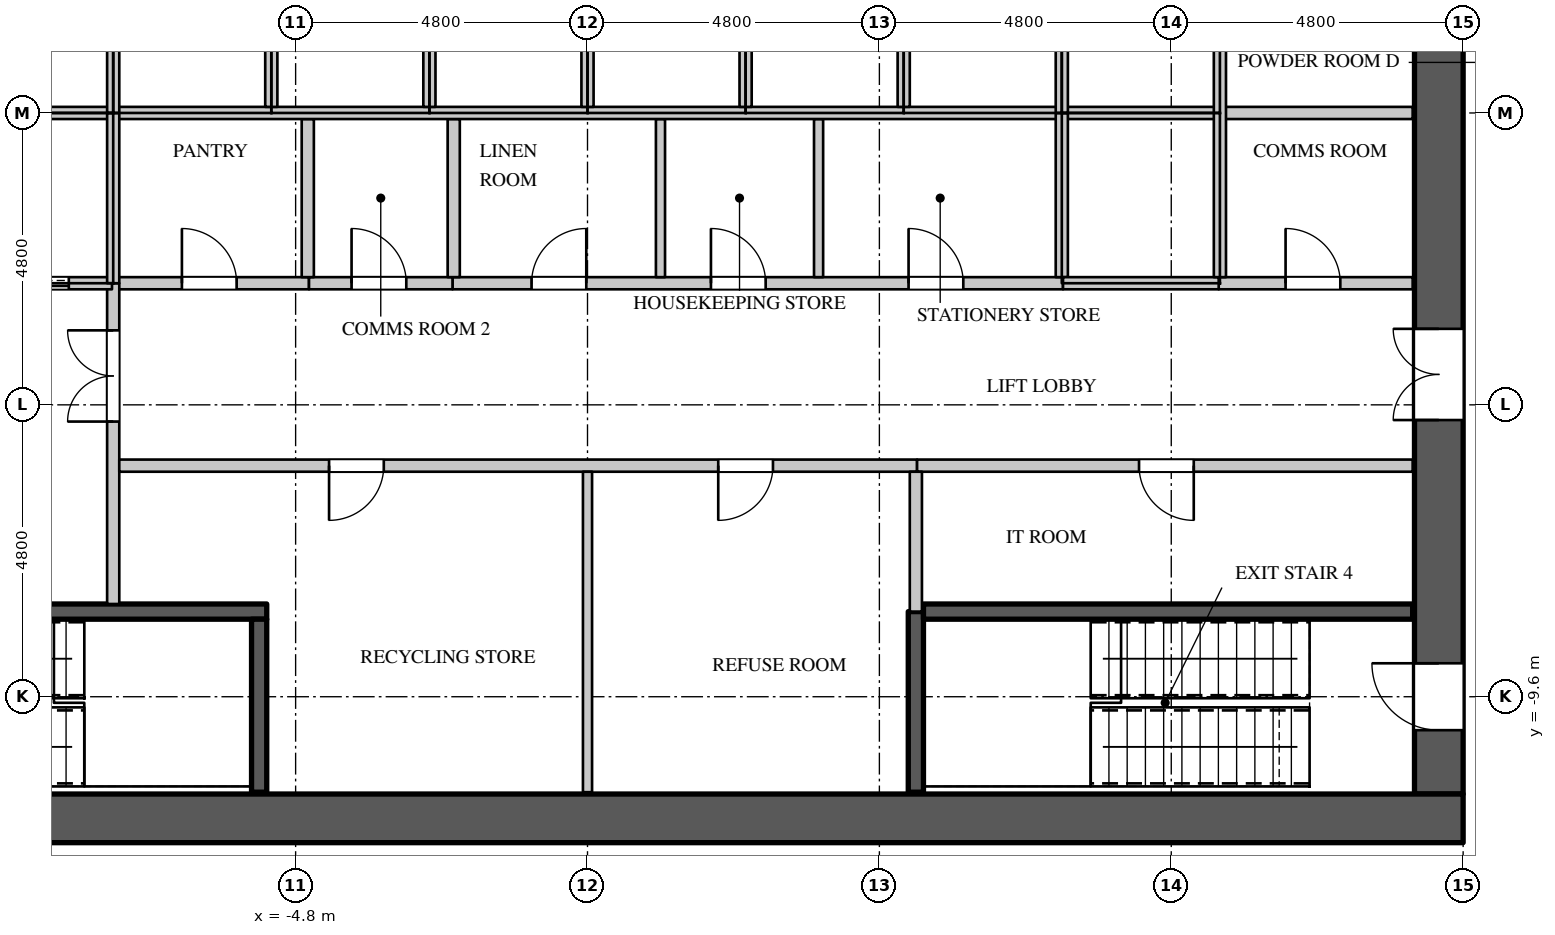
"""IFC4 building model, lengths in metres.
Left out: names, types, materials, properties, quantities, classifications, styles, units other than length and angle.
Written with IfcOpenShell. Run it as: python <this file> out.ifc"""

import sys

from ifc_helpers import new_model, si_unit, direction, frame, frame_2d, origin, place, context, subcontext, project, spatial, rectangle, extrude, element, fill, save


model = new_model("IFC4")
c1 = context("Model", 3, precision=1e-05, world=origin(), true_north=direction((0.0, 1.0)))
c2 = subcontext(c1, "Body", "Model", "MODEL_VIEW")
j1 = project(units=[si_unit("LENGTHUNIT", "METRE"), si_unit("PLANEANGLEUNIT", "RADIAN")], contexts=[c1])
p1 = place(None, origin())
s1 = spatial("IfcSite", under=j1, at=p1, CompositionType="ELEMENT")
p2 = place(p1, origin())
s2 = spatial("IfcBuilding", under=s1, at=p2, CompositionType="ELEMENT")
p3 = place(p2, frame((0.0, 0.0, 106.5)))
s3 = spatial("IfcBuildingStorey", under=s2, at=p3, CompositionType="ELEMENT", Elevation=106.5)
p4 = place(p3, frame((-14.4, -11.6, 0.0), z_axis=(0.0, 0.0, 1.0), x_axis=(1.0, 0.0, 0.0)))
e1 = element("IfcWall", 1, at=p4, inside=s3, PredefinedType="SHEAR", context=c2, shape_type="SweptSolid", body=[
    extrude(rectangle(XDim=28.8, YDim=0.8, at=frame_2d((14.4, 0.0))), origin(), (0.0, 0.0, 1.0), 4.2),
])
p5 = place(p3, frame((14.0, -11.2, 0.0), z_axis=(0.0, 0.0, 1.0), x_axis=(0.0, 1.0, 0.0)))
e2 = element("IfcWall", 2, at=p5, inside=s3, PredefinedType="SHEAR", context=c2, shape_type="SweptSolid", body=[
    extrude(rectangle(XDim=22.4, YDim=0.8, at=frame_2d((11.2, 0.0))), origin(), (0.0, 0.0, 1.0), 4.2),
])
p6 = place(p5, frame((20.25, 0.0, 0.0)))
e3 = element("IfcOpeningElement", 3, at=p6, cuts=e2, PredefinedType="OPENING", context=c2, shape_type="SweptSolid", body=[
    extrude(rectangle(XDim=1.1, YDim=2.2, at=frame_2d((0.55, 1.1))), frame((0.0, 0.41, 0.0), z_axis=(0.0, -1.0, 0.0), x_axis=(1.0, 0.0, 0.0)), (0.0, 0.0, 1.0), 0.82),
])
p7 = place(p5, frame((1.05, 0.0, 0.0)))
e4 = element("IfcOpeningElement", 4, at=p7, cuts=e2, PredefinedType="OPENING", context=c2, shape_type="SweptSolid", body=[
    extrude(rectangle(XDim=1.1, YDim=2.2, at=frame_2d((0.55, 1.1))), frame((0.0, 0.41, 0.0), z_axis=(0.0, -1.0, 0.0), x_axis=(1.0, 0.0, 0.0)), (0.0, 0.0, 1.0), 0.82),
])
p8 = place(p5, frame((14.75, 0.0, 0.0)))
e5 = element("IfcOpeningElement", 5, at=p8, cuts=e2, PredefinedType="OPENING", context=c2, shape_type="SweptSolid", body=[
    extrude(rectangle(XDim=1.5, YDim=2.4, at=frame_2d((0.75, 1.2))), frame((0.0, 0.41, 0.0), z_axis=(0.0, -1.0, 0.0), x_axis=(1.0, 0.0, 0.0)), (0.0, 0.0, 1.0), 0.82),
])
p9 = place(p5, frame((6.15, 0.0, 0.0)))
e6 = element("IfcOpeningElement", 6, at=p9, cuts=e2, PredefinedType="OPENING", context=c2, shape_type="SweptSolid", body=[
    extrude(rectangle(XDim=1.5, YDim=2.4, at=frame_2d((0.75, 1.2))), frame((0.0, 0.41, 0.0), z_axis=(0.0, -1.0, 0.0), x_axis=(1.0, 0.0, 0.0)), (0.0, 0.0, 1.0), 0.82),
])
p10 = place(p3, frame((-7.82, -2.8, 0.0), z_axis=(0.0, 0.0, 1.0), x_axis=(1.0, 0.0, 0.0)))
e7 = element("IfcWall", 7, at=p10, inside=s3, PredefinedType="PARTITIONING", context=c2, shape_type="SweptSolid", body=[
    extrude(rectangle(XDim=3.24, YDim=0.2, at=frame_2d((1.62, 0.0))), origin(), (0.0, 0.0, 1.0), 3.95),
])
p11 = place(p10, frame((1.15, 0.0, 0.0)))
e8 = element("IfcOpeningElement", 8, at=p11, cuts=e7, PredefinedType="OPENING", context=c2, shape_type="SweptSolid", body=[
    extrude(rectangle(XDim=0.9, YDim=2.2, at=frame_2d((0.45, 1.1))), frame((0.0, 0.11, 0.0), z_axis=(0.0, -1.0, 0.0), x_axis=(1.0, 0.0, 0.0)), (0.0, 0.0, 1.0), 0.22),
])
p12 = place(p3, frame((-7.8, -8.075, 0.0), z_axis=(0.0, 0.0, 1.0), x_axis=(0.0, 1.0, 0.0)))
e9 = element("IfcWall", 9, at=p12, inside=s3, PredefinedType="PARTITIONING", context=c2, shape_type="SweptSolid", body=[
    extrude(rectangle(XDim=5.275, YDim=0.2, at=frame_2d((2.637, 0.0))), origin(), (0.0, 0.0, 1.0), 3.95),
])
p13 = place(p12, frame((3.0, 0.0, 0.0)))
e10 = element("IfcOpeningElement", 10, at=p13, cuts=e9, PredefinedType="OPENING", context=c2, shape_type="SweptSolid", body=[
    extrude(rectangle(XDim=1.5, YDim=2.4, at=frame_2d((0.75, 1.2))), frame((0.0, 0.11, 0.0), z_axis=(0.0, -1.0, 0.0), x_axis=(1.0, 0.0, 0.0)), (0.0, 0.0, 1.0), 0.22),
])
p14 = place(p3, frame((-7.7, -5.8, 0.0), z_axis=(0.0, 0.0, 1.0), x_axis=(1.0, 0.0, 0.0)))
e11 = element("IfcWall", 11, at=p14, inside=s3, PredefinedType="PARTITIONING", context=c2, shape_type="SweptSolid", body=[
    extrude(rectangle(XDim=13.12, YDim=0.2, at=frame_2d((6.56, 0.0))), origin(), (0.0, 0.0, 1.0), 3.95),
])
p15 = place(p14, frame((3.45, 0.0, 0.0)))
e12 = element("IfcOpeningElement", 12, at=p15, cuts=e11, PredefinedType="OPENING", context=c2, shape_type="SweptSolid", body=[
    extrude(rectangle(XDim=0.9, YDim=2.2, at=frame_2d((0.45, 1.1))), frame((0.0, 0.11, 0.0), z_axis=(0.0, -1.0, 0.0), x_axis=(1.0, 0.0, 0.0)), (0.0, 0.0, 1.0), 0.22),
])
p16 = place(p14, frame((9.85, 0.0, 0.0)))
e13 = element("IfcOpeningElement", 13, at=p16, cuts=e11, PredefinedType="OPENING", context=c2, shape_type="SweptSolid", body=[
    extrude(rectangle(XDim=0.9, YDim=2.2, at=frame_2d((0.45, 1.1))), frame((0.0, 0.11, 0.0), z_axis=(0.0, -1.0, 0.0), x_axis=(1.0, 0.0, 0.0)), (0.0, 0.0, 1.0), 0.22),
])
p17 = place(p3, frame((-2.22, -2.8, 0.0), z_axis=(0.0, 0.0, 1.0), x_axis=(1.0, 0.0, 0.0)))
e14 = element("IfcWall", 14, at=p17, inside=s3, PredefinedType="PARTITIONING", context=c2, shape_type="SweptSolid", body=[
    extrude(rectangle(XDim=10.04, YDim=0.2, at=frame_2d((5.02, 0.0))), origin(), (0.0, 0.0, 1.0), 3.95),
])
p18 = place(p17, frame((1.3, 0.0, 0.0)))
e15 = element("IfcOpeningElement", 15, at=p18, cuts=e14, PredefinedType="OPENING", context=c2, shape_type="SweptSolid", body=[
    extrude(rectangle(XDim=0.9, YDim=2.2, at=frame_2d((0.45, 1.1))), frame((0.0, 0.11, 0.0), z_axis=(0.0, -1.0, 0.0), x_axis=(1.0, 0.0, 0.0)), (0.0, 0.0, 1.0), 0.22),
])
p19 = place(p17, frame((4.25, 0.0, 0.0)))
e16 = element("IfcOpeningElement", 16, at=p19, cuts=e14, PredefinedType="OPENING", context=c2, shape_type="SweptSolid", body=[
    extrude(rectangle(XDim=0.9, YDim=2.2, at=frame_2d((0.45, 1.1))), frame((0.0, 0.11, 0.0), z_axis=(0.0, -1.0, 0.0), x_axis=(1.0, 0.0, 0.0)), (0.0, 0.0, 1.0), 0.22),
])
p20 = place(p17, frame((7.5, 0.0, 0.0)))
e17 = element("IfcOpeningElement", 17, at=p20, cuts=e14, PredefinedType="OPENING", context=c2, shape_type="SweptSolid", body=[
    extrude(rectangle(XDim=0.9, YDim=2.2, at=frame_2d((0.45, 1.1))), frame((0.0, 0.11, 0.0), z_axis=(0.0, -1.0, 0.0), x_axis=(1.0, 0.0, 0.0)), (0.0, 0.0, 1.0), 0.22),
])
p21 = place(p3, frame((0.0, -11.17, 0.0), z_axis=(0.0, 0.0, 1.0), x_axis=(0.0, 1.0, 0.0)))
e18 = element("IfcWall", 18, at=p21, inside=s3, PredefinedType="PARTITIONING", context=c2, shape_type="SweptSolid", body=[
    extrude(rectangle(XDim=5.27, YDim=0.15, at=frame_2d((2.635, 0.0))), origin(), (0.0, 0.0, 1.0), 3.95),
])
for number, where, z_axis, x_axis in (
    (19, (1.2, -2.7, 0.0), (0.0, 0.0, 1.0), (0.0, 1.0, 0.0)),
    (20, (3.8, -2.7, 0.0), (0.0, 0.0, 1.0), (0.0, 1.0, 0.0)),
):
    element("IfcWall", number, at=place(p3, frame(where, z_axis=z_axis, x_axis=x_axis)), inside=s3, PredefinedType="PARTITIONING", context=c2, shape_type="SweptSolid", body=[
        extrude(rectangle(XDim=2.6, YDim=0.15, at=frame_2d((1.3, 0.0))), origin(), (0.0, 0.0, 1.0), 3.95),
    ])
p22 = place(p3, frame((-4.58, -2.8, 0.0), z_axis=(0.0, 0.0, 1.0), x_axis=(1.0, 0.0, 0.0)))
e21 = element("IfcWall", 21, at=p22, inside=s3, PredefinedType="PARTITIONING", context=c2, shape_type="SweptSolid", body=[
    extrude(rectangle(XDim=2.36, YDim=0.2, at=frame_2d((1.18, 0.0))), origin(), (0.0, 0.0, 1.0), 3.95),
])
p23 = place(p22, frame((0.7, 0.0, 0.0)))
e22 = element("IfcOpeningElement", 22, at=p23, cuts=e21, PredefinedType="OPENING", context=c2, shape_type="SweptSolid", body=[
    extrude(rectangle(XDim=0.9, YDim=2.2, at=frame_2d((0.45, 1.1))), frame((0.0, 0.11, 0.0), z_axis=(0.0, -1.0, 0.0), x_axis=(1.0, 0.0, 0.0)), (0.0, 0.0, 1.0), 0.22),
])
for number, where, z_axis, x_axis in (
    (23, (-4.6, -2.7, 0.0), (0.0, 0.0, 1.0), (0.0, 1.0, 0.0)),
    (24, (-2.2, -2.7, 0.0), (0.0, 0.0, 1.0), (0.0, 1.0, 0.0)),
):
    element("IfcWall", number, at=place(p3, frame(where, z_axis=z_axis, x_axis=x_axis)), inside=s3, PredefinedType="PARTITIONING", context=c2, shape_type="SweptSolid", body=[
        extrude(rectangle(XDim=2.6, YDim=0.2, at=frame_2d((1.3, 0.0))), origin(), (0.0, 0.0, 1.0), 3.95),
    ])
p24 = place(p3, frame((5.42, -5.8, 0.0), z_axis=(0.0, 0.0, 1.0), x_axis=(1.0, 0.0, 0.0)))
e25 = element("IfcWall", 25, at=p24, inside=s3, PredefinedType="PARTITIONING", context=c2, shape_type="SweptSolid", body=[
    extrude(rectangle(XDim=8.15, YDim=0.2, at=frame_2d((4.075, 0.0))), origin(), (0.0, 0.0, 1.0), 3.95),
])
p25 = place(p24, frame((3.65, 0.0, 0.0)))
e26 = element("IfcOpeningElement", 26, at=p25, cuts=e25, PredefinedType="OPENING", context=c2, shape_type="SweptSolid", body=[
    extrude(rectangle(XDim=0.9, YDim=2.2, at=frame_2d((0.45, 1.1))), frame((0.0, 0.11, 0.0), z_axis=(0.0, -1.0, 0.0), x_axis=(1.0, 0.0, 0.0)), (0.0, 0.0, 1.0), 0.22),
])
p26 = place(p3, frame((5.4, -8.2, 0.0), z_axis=(0.0, 0.0, 1.0), x_axis=(0.0, 1.0, 0.0)))
e27 = element("IfcWall", 27, at=p26, inside=s3, PredefinedType="PARTITIONING", context=c2, shape_type="SweptSolid", body=[
    extrude(rectangle(XDim=2.3, YDim=0.2, at=frame_2d((1.15, 0.0))), origin(), (0.0, 0.0, 1.0), 3.95),
])
p27 = place(p3, frame((10.38, -2.8, 0.0), z_axis=(0.0, 0.0, 1.0), x_axis=(1.0, 0.0, 0.0)))
e28 = element("IfcWall", 28, at=p27, inside=s3, PredefinedType="PARTITIONING", context=c2, shape_type="SweptSolid", body=[
    extrude(rectangle(XDim=3.19, YDim=0.2, at=frame_2d((1.595, 0.0))), origin(), (0.0, 0.0, 1.0), 3.95),
])
p28 = place(p27, frame((1.1, 0.0, 0.0)))
e29 = element("IfcOpeningElement", 29, at=p28, cuts=e28, PredefinedType="OPENING", context=c2, shape_type="SweptSolid", body=[
    extrude(rectangle(XDim=0.9, YDim=2.2, at=frame_2d((0.45, 1.1))), frame((0.0, 0.11, 0.0), z_axis=(0.0, -1.0, 0.0), x_axis=(1.0, 0.0, 0.0)), (0.0, 0.0, 1.0), 0.22),
])
p29 = place(p3, frame((10.4, 0.0, 0.0), z_axis=(0.0, 0.0, 1.0), x_axis=(1.0, 0.0, 0.0)))
e30 = element("IfcWall", 30, at=p29, inside=s3, PredefinedType="PARTITIONING", context=c2, shape_type="SweptSolid", body=[
    extrude(rectangle(XDim=3.17, YDim=0.2, at=frame_2d((1.585, 0.0))), origin(), (0.0, 0.0, 1.0), 3.95),
])
p30 = place(p3, frame((-13.57, 0.0, 0.0), z_axis=(0.0, 0.0, 1.0), x_axis=(1.0, 0.0, 0.0)))
e31 = element("IfcWall", 31, at=p30, inside=s3, PredefinedType="PARTITIONING", context=c2, shape_type="SweptSolid", body=[
    extrude(rectangle(XDim=23.97, YDim=0.2, at=frame_2d((11.985, 0.0))), origin(), (0.0, 0.0, 1.0), 3.95),
])
p31 = place(p3, frame((-10.38, -2.8, 0.0), z_axis=(0.0, 0.0, 1.0), x_axis=(1.0, 0.0, 0.0)))
e32 = element("IfcWall", 32, at=p31, inside=s3, PredefinedType="PARTITIONING", context=c2, shape_type="SweptSolid", body=[
    extrude(rectangle(XDim=2.56, YDim=0.2, at=frame_2d((1.28, 0.0))), origin(), (0.0, 0.0, 1.0), 3.95),
])
p32 = place(p31, frame((0.75, 0.0, 0.0)))
e33 = element("IfcOpeningElement", 33, at=p32, cuts=e32, PredefinedType="OPENING", context=c2, shape_type="SweptSolid", body=[
    extrude(rectangle(XDim=1.1, YDim=2.2, at=frame_2d((0.55, 1.1))), frame((0.0, 0.11, 0.0), z_axis=(0.0, -1.0, 0.0), x_axis=(1.0, 0.0, 0.0)), (0.0, 0.0, 1.0), 0.22),
])
for number, where, z_axis, x_axis in (
    (34, (-7.8, -2.8, 0.0), (0.0, 0.0, 1.0), (0.0, 1.0, 0.0)),
    (35, (-7.8, 0.0, 0.0), (0.0, 0.0, 1.0), (0.0, 1.0, 0.0)),
):
    element("IfcWall", number, at=place(p3, frame(where, z_axis=z_axis, x_axis=x_axis)), inside=s3, PredefinedType="PARTITIONING", context=c2, shape_type="SweptSolid", body=[
        extrude(rectangle(XDim=2.8, YDim=0.2, at=frame_2d((1.4, 0.0))), origin(), (0.0, 0.0, 1.0), 3.95),
    ])
for number, where, z_axis, x_axis in (
    (36, (-5.2, 0.1, 0.0), (0.0, 0.0, 1.0), (0.0, 1.0, 0.0)),
    (37, (-2.6, 0.1, 0.0), (0.0, 0.0, 1.0), (0.0, 1.0, 0.0)),
    (38, (0.0, 0.1, 0.0), (0.0, 0.0, 1.0), (0.0, 1.0, 0.0)),
    (39, (2.6, 0.1, 0.0), (0.0, 0.0, 1.0), (0.0, 1.0, 0.0)),
    (40, (5.2, 0.1, 0.0), (0.0, 0.0, 1.0), (0.0, 1.0, 0.0)),
):
    element("IfcWall", number, at=place(p3, frame(where, z_axis=z_axis, x_axis=x_axis)), inside=s3, PredefinedType="PARTITIONING", context=c2, shape_type="SweptSolid", body=[
        extrude(rectangle(XDim=2.6, YDim=0.2, at=frame_2d((1.3, 0.0))), origin(), (0.0, 0.0, 1.0), 3.95),
    ])
p33 = place(p3, frame((7.8, -2.7, 0.0), z_axis=(0.0, 0.0, 1.0), x_axis=(0.0, 1.0, 0.0)))
e41 = element("IfcWall", 41, at=p33, inside=s3, PredefinedType="PARTITIONING", context=c2, shape_type="SweptSolid", body=[
    extrude(rectangle(XDim=2.7, YDim=0.2, at=frame_2d((1.35, 0.0))), origin(), (0.0, 0.0, 1.0), 3.95),
])
p34 = place(p3, frame((7.82, -2.8, 0.0), z_axis=(0.0, 0.0, 1.0), x_axis=(1.0, 0.0, 0.0)))
e42 = element("IfcWall", 42, at=p34, inside=s3, PredefinedType="PARTITIONING", context=c2, shape_type="SweptSolid", body=[
    extrude(rectangle(XDim=2.56, YDim=0.2, at=frame_2d((1.28, 0.0))), origin(), (0.0, 0.0, 1.0), 3.95),
])
p35 = place(p3, frame((7.8, 0.0, 0.0), z_axis=(0.0, 0.0, 1.0), x_axis=(0.0, 1.0, 0.0)))
e43 = element("IfcWall", 43, at=p35, inside=s3, PredefinedType="PARTITIONING", context=c2, shape_type="SweptSolid", body=[
    extrude(rectangle(XDim=2.7, YDim=0.2, at=frame_2d((1.35, 0.0))), origin(), (0.0, 0.0, 1.0), 3.95),
])
p36 = place(p3, frame((10.4, -2.7, 0.0), z_axis=(0.0, 0.0, 1.0), x_axis=(0.0, 1.0, 0.0)))
e44 = element("IfcWall", 44, at=p36, inside=s3, PredefinedType="PARTITIONING", context=c2, shape_type="SweptSolid", body=[
    extrude(rectangle(XDim=5.4, YDim=0.2, at=frame_2d((2.7, 0.0))), origin(), (0.0, 0.0, 1.0), 3.95),
])
p37 = place(p3, frame((-13.57, -8.2, 0.0), z_axis=(0.0, 0.0, 1.0), x_axis=(1.0, 0.0, 0.0)))
e45 = element("IfcWall", 45, at=p37, inside=s3, PredefinedType="SHEAR", context=c2, shape_type="SweptSolid", body=[
    extrude(rectangle(XDim=8.295, YDim=0.25, at=frame_2d((4.147, 0.0))), origin(), (0.0, 0.0, 1.0), 3.95),
])
p38 = place(p37, frame((0.15, 0.0, 0.0)))
e46 = element("IfcOpeningElement", 46, at=p38, cuts=e45, PredefinedType="OPENING", context=c2, shape_type="SweptSolid", body=[
    extrude(rectangle(XDim=1.1, YDim=2.2, at=frame_2d((0.55, 1.1))), frame((0.0, 0.135, 0.0), z_axis=(0.0, -1.0, 0.0), x_axis=(1.0, 0.0, 0.0)), (0.0, 0.0, 1.0), 0.27),
])
p39 = place(p3, frame((-5.4, -11.17, 0.0), z_axis=(0.0, 0.0, 1.0), x_axis=(0.0, 1.0, 0.0)))
e47 = element("IfcWall", 47, at=p39, inside=s3, PredefinedType="SHEAR", context=c2, shape_type="SweptSolid", body=[
    extrude(rectangle(XDim=2.845, YDim=0.25, at=frame_2d((1.422, 0.0))), origin(), (0.0, 0.0, 1.0), 3.95),
])
p40 = place(p3, frame((5.4, -11.17, 0.0), z_axis=(0.0, 0.0, 1.0), x_axis=(0.0, 1.0, 0.0)))
e48 = element("IfcWall", 48, at=p40, inside=s3, PredefinedType="SHEAR", context=c2, shape_type="SweptSolid", body=[
    extrude(rectangle(XDim=2.97, YDim=0.25, at=frame_2d((1.485, 0.0))), origin(), (0.0, 0.0, 1.0), 3.95),
])
p41 = place(p3, frame((5.525, -8.2, 0.0), z_axis=(0.0, 0.0, 1.0), x_axis=(1.0, 0.0, 0.0)))
e49 = element("IfcWall", 49, at=p41, inside=s3, PredefinedType="SHEAR", context=c2, shape_type="SweptSolid", body=[
    extrude(rectangle(XDim=8.045, YDim=0.25, at=frame_2d((4.022, 0.0))), origin(), (0.0, 0.0, 1.0), 3.95),
])
p42 = place(p28, origin())
e50 = element("IfcDoor", 50, at=p42, inside=s3, OperationType="SINGLE_SWING_LEFT", PredefinedType="DOOR", context=c2, shape_type="SweptSolid", body=[
    extrude(rectangle(XDim=0.9, YDim=2.2, at=frame_2d((0.45, 1.1))), frame((0.0, 0.025, 0.0), z_axis=(0.0, -1.0, 0.0), x_axis=(1.0, 0.0, 0.0)), (0.0, 0.0, 1.0), 0.05),
])
fill(e29, e50)
p43 = place(p15, origin())
e51 = element("IfcDoor", 51, at=p43, inside=s3, OperationType="SINGLE_SWING_RIGHT", PredefinedType="DOOR", context=c2, shape_type="SweptSolid", body=[
    extrude(rectangle(XDim=0.9, YDim=2.2, at=frame_2d((0.45, 1.1))), frame((0.0, 0.025, 0.0), z_axis=(0.0, -1.0, 0.0), x_axis=(1.0, 0.0, 0.0)), (0.0, 0.0, 1.0), 0.05),
])
fill(e12, e51)
p44 = place(p16, origin())
e52 = element("IfcDoor", 52, at=p44, inside=s3, OperationType="SINGLE_SWING_RIGHT", PredefinedType="DOOR", context=c2, shape_type="SweptSolid", body=[
    extrude(rectangle(XDim=0.9, YDim=2.2, at=frame_2d((0.45, 1.1))), frame((0.0, 0.025, 0.0), z_axis=(0.0, -1.0, 0.0), x_axis=(1.0, 0.0, 0.0)), (0.0, 0.0, 1.0), 0.05),
])
fill(e13, e52)
p45 = place(p25, origin())
e53 = element("IfcDoor", 53, at=p45, inside=s3, OperationType="SINGLE_SWING_LEFT", PredefinedType="DOOR", context=c2, shape_type="SweptSolid", body=[
    extrude(rectangle(XDim=0.9, YDim=2.2, at=frame_2d((0.45, 1.1))), frame((0.0, 0.025, 0.0), z_axis=(0.0, -1.0, 0.0), x_axis=(1.0, 0.0, 0.0)), (0.0, 0.0, 1.0), 0.05),
])
fill(e26, e53)
p46 = place(p11, origin())
e54 = element("IfcDoor", 54, at=p46, inside=s3, OperationType="SINGLE_SWING_LEFT", PredefinedType="DOOR", context=c2, shape_type="SweptSolid", body=[
    extrude(rectangle(XDim=0.9, YDim=2.2, at=frame_2d((0.45, 1.1))), frame((0.0, 0.025, 0.0), z_axis=(0.0, -1.0, 0.0), x_axis=(1.0, 0.0, 0.0)), (0.0, 0.0, 1.0), 0.05),
])
fill(e8, e54)
p47 = place(p23, origin())
e55 = element("IfcDoor", 55, at=p47, inside=s3, OperationType="SINGLE_SWING_LEFT", PredefinedType="DOOR", context=c2, shape_type="SweptSolid", body=[
    extrude(rectangle(XDim=0.9, YDim=2.2, at=frame_2d((0.45, 1.1))), frame((0.0, 0.025, 0.0), z_axis=(0.0, -1.0, 0.0), x_axis=(1.0, 0.0, 0.0)), (0.0, 0.0, 1.0), 0.05),
])
fill(e22, e55)
p48 = place(p18, origin())
e56 = element("IfcDoor", 56, at=p48, inside=s3, OperationType="SINGLE_SWING_RIGHT", PredefinedType="DOOR", context=c2, shape_type="SweptSolid", body=[
    extrude(rectangle(XDim=0.9, YDim=2.2, at=frame_2d((0.45, 1.1))), frame((0.0, 0.025, 0.0), z_axis=(0.0, -1.0, 0.0), x_axis=(1.0, 0.0, 0.0)), (0.0, 0.0, 1.0), 0.05),
])
fill(e15, e56)
p49 = place(p19, origin())
e57 = element("IfcDoor", 57, at=p49, inside=s3, OperationType="SINGLE_SWING_LEFT", PredefinedType="DOOR", context=c2, shape_type="SweptSolid", body=[
    extrude(rectangle(XDim=0.9, YDim=2.2, at=frame_2d((0.45, 1.1))), frame((0.0, 0.025, 0.0), z_axis=(0.0, -1.0, 0.0), x_axis=(1.0, 0.0, 0.0)), (0.0, 0.0, 1.0), 0.05),
])
fill(e16, e57)
p50 = place(p20, origin())
e58 = element("IfcDoor", 58, at=p50, inside=s3, OperationType="SINGLE_SWING_LEFT", PredefinedType="DOOR", context=c2, shape_type="SweptSolid", body=[
    extrude(rectangle(XDim=0.9, YDim=2.2, at=frame_2d((0.45, 1.1))), frame((0.0, 0.025, 0.0), z_axis=(0.0, -1.0, 0.0), x_axis=(1.0, 0.0, 0.0)), (0.0, 0.0, 1.0), 0.05),
])
fill(e17, e58)
p51 = place(p32, origin())
e59 = element("IfcDoor", 59, at=p51, inside=s3, OperationType="DOUBLE_DOOR_SLIDING", PredefinedType="DOOR", context=c2, shape_type="SweptSolid", body=[
    extrude(rectangle(XDim=1.1, YDim=2.2, at=frame_2d((0.55, 1.1))), frame((0.0, 0.025, 0.0), z_axis=(0.0, -1.0, 0.0), x_axis=(1.0, 0.0, 0.0)), (0.0, 0.0, 1.0), 0.05),
])
fill(e33, e59)
p52 = place(p13, origin())
e60 = element("IfcDoor", 60, at=p52, inside=s3, OperationType="DOUBLE_DOOR_SINGLE_SWING", PredefinedType="DOOR", context=c2, shape_type="SweptSolid", body=[
    extrude(rectangle(XDim=1.5, YDim=2.4, at=frame_2d((0.75, 1.2))), frame((0.0, 0.025, 0.0), z_axis=(0.0, -1.0, 0.0), x_axis=(1.0, 0.0, 0.0)), (0.0, 0.0, 1.0), 0.05),
])
fill(e10, e60)
p53 = place(p7, origin())
e61 = element("IfcDoor", 61, at=p53, inside=s3, OperationType="SINGLE_SWING_RIGHT", PredefinedType="DOOR", context=c2, shape_type="SweptSolid", body=[
    extrude(rectangle(XDim=1.1, YDim=2.2, at=frame_2d((0.55, 1.1))), frame((0.0, 0.395, 0.0), z_axis=(0.0, -1.0, 0.0), x_axis=(1.0, 0.0, 0.0)), (0.0, 0.0, 1.0), 0.05),
])
fill(e4, e61)
p54 = place(p9, origin())
e62 = element("IfcDoor", 62, at=p54, inside=s3, OperationType="DOUBLE_DOOR_SINGLE_SWING", PredefinedType="DOOR", context=c2, shape_type="SweptSolid", body=[
    extrude(rectangle(XDim=1.5, YDim=2.4, at=frame_2d((0.75, 1.2))), frame((0.0, 0.395, 0.0), z_axis=(0.0, -1.0, 0.0), x_axis=(1.0, 0.0, 0.0)), (0.0, 0.0, 1.0), 0.05),
])
fill(e6, e62)
save(model, sys.argv[1])
